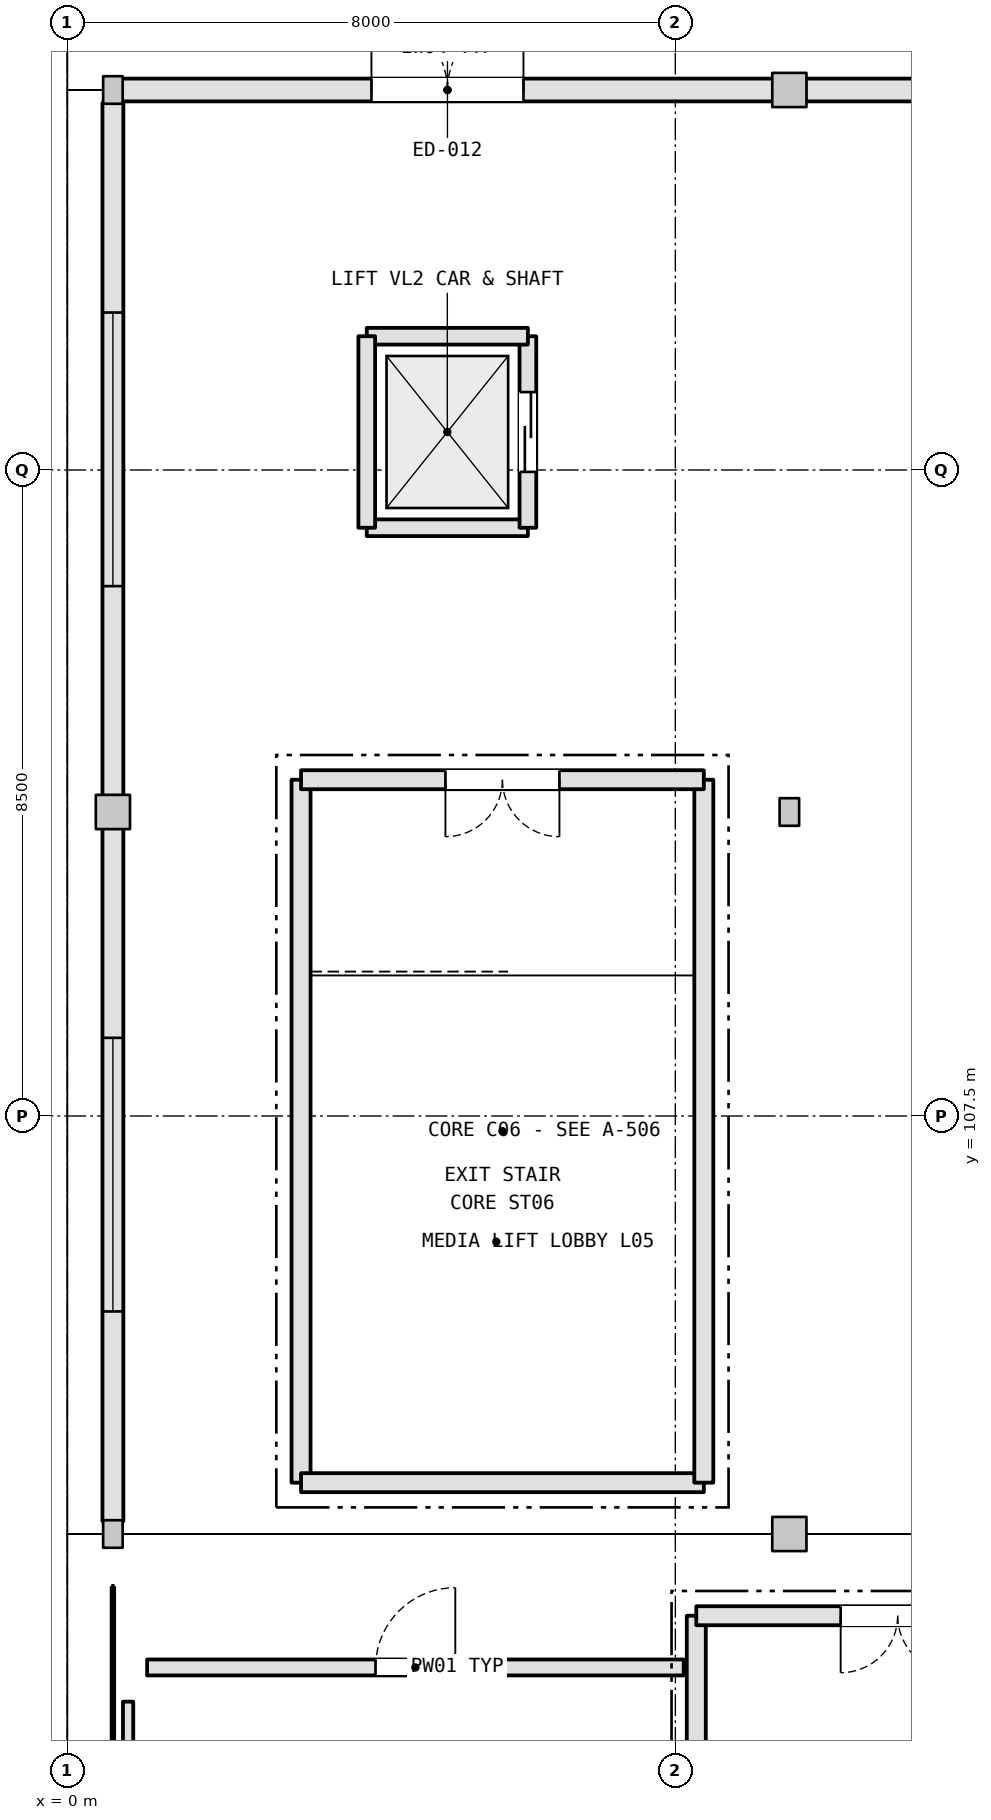
"""IFC4 building model, lengths in metres.
Left out: names, types, materials, properties, quantities, classifications, styles, units other than length and angle.
Written with IfcOpenShell. Run it as: python <this file> out.ifc"""

import sys

from ifc_helpers import new_model, si_unit, direction, frame, frame_2d, origin, origin_2d, place, context, subcontext, project, spatial, rectangle, i_section, extrude, element, fill, save


model = new_model("IFC4")
c1 = context("Model", 3, precision=1e-05, world=origin(), true_north=direction((0.0, 1.0)))
c2 = subcontext(c1, "Body", "Model", "MODEL_VIEW")
j1 = project(units=[si_unit("LENGTHUNIT", "METRE"), si_unit("PLANEANGLEUNIT", "RADIAN")], contexts=[c1])
p1 = place(None, origin())
s1 = spatial("IfcSite", under=j1, at=p1, CompositionType="ELEMENT")
p2 = place(p1, origin())
s2 = spatial("IfcBuilding", under=s1, at=p2, CompositionType="ELEMENT")
p3 = place(p2, frame((0.0, 0.0, 27.0)))
s3 = spatial("IfcBuildingStorey", under=s2, at=p3, CompositionType="ELEMENT", Elevation=27.0)
p4 = place(p3, frame((0.6, 102.0, 0.0), z_axis=(0.0, 0.0, 1.0), x_axis=(1.0, 0.0, 0.0)))
e1 = element("IfcColumn", 1, at=p4, inside=s3, PredefinedType="COLUMN", context=c2, shape_type="SweptSolid", body=[
    extrude(i_section(OverallWidth=0.257, OverallDepth=0.363, WebThickness=0.013, FlangeThickness=0.022, FilletRadius=0.015, at=origin_2d()), origin(), (0.0, 0.0, 1.0), 4.671),
])
p5 = place(p3, frame((0.6, 111.5, 0.0), z_axis=(0.0, 0.0, 1.0), x_axis=(1.0, 0.0, 0.0)))
e2 = element("IfcColumn", 2, at=p5, inside=s3, PredefinedType="COLUMN", context=c2, shape_type="SweptSolid", body=[
    extrude(rectangle(XDim=0.45, YDim=0.45, at=origin_2d()), origin(), (0.0, 0.0, 1.0), 4.671),
])
p6 = place(p3, frame((0.6, 121.0, 0.0), z_axis=(0.0, 0.0, 1.0), x_axis=(1.0, 0.0, 0.0)))
e3 = element("IfcColumn", 3, at=p6, inside=s3, PredefinedType="COLUMN", context=c2, shape_type="SweptSolid", body=[
    extrude(i_section(OverallWidth=0.257, OverallDepth=0.363, WebThickness=0.013, FlangeThickness=0.022, FilletRadius=0.015, at=origin_2d()), origin(), (0.0, 0.0, 1.0), 4.671),
])
p7 = place(p3, frame((9.5, 102.0, 0.0), z_axis=(0.0, 0.0, 1.0), x_axis=(1.0, 0.0, 0.0)))
e4 = element("IfcColumn", 4, at=p7, inside=s3, PredefinedType="COLUMN", context=c2, shape_type="SweptSolid", body=[
    extrude(rectangle(XDim=0.45, YDim=0.45, at=origin_2d()), origin(), (0.0, 0.0, 1.0), 5.428),
])
p8 = place(p3, frame((9.5, 111.5, 0.0), z_axis=(0.0, 0.0, 1.0), x_axis=(1.0, 0.0, 0.0)))
e5 = element("IfcColumn", 5, at=p8, inside=s3, PredefinedType="COLUMN", context=c2, shape_type="SweptSolid", body=[
    extrude(i_section(OverallWidth=0.257, OverallDepth=0.363, WebThickness=0.013, FlangeThickness=0.022, FilletRadius=0.015, at=origin_2d()), origin(), (0.0, 0.0, 1.0), 5.428),
])
p9 = place(p3, frame((9.5, 121.0, 0.0), z_axis=(0.0, 0.0, 1.0), x_axis=(1.0, 0.0, 0.0)))
e6 = element("IfcColumn", 6, at=p9, inside=s3, PredefinedType="COLUMN", context=c2, shape_type="SweptSolid", body=[
    extrude(rectangle(XDim=0.45, YDim=0.45, at=origin_2d()), origin(), (0.0, 0.0, 1.0), 5.428),
])
p10 = place(p3, frame((0.6, 102.169, 0.0), z_axis=(0.0, 0.0, 1.0), x_axis=(0.0, 1.0, 0.0)))
e7 = element("IfcWall", 7, at=p10, inside=s3, PredefinedType="STANDARD", context=c2, shape_type="SweptSolid", body=[
    extrude(rectangle(XDim=9.118, YDim=0.275, at=frame_2d((4.559, 0.0))), origin(), (0.0, 0.0, 1.0), 3.5),
])
p11 = place(p10, frame((2.759, 0.0, 1.05)))
e8 = element("IfcOpeningElement", 8, at=p11, cuts=e7, PredefinedType="OPENING", context=c2, shape_type="SweptSolid", body=[
    extrude(rectangle(XDim=3.6, YDim=2.0, at=frame_2d((1.8, 1.0))), frame((0.0, 0.147, 0.0), z_axis=(0.0, -1.0, 0.0), x_axis=(1.0, 0.0, 0.0)), (0.0, 0.0, 1.0), 0.295),
])
p12 = place(p3, frame((0.6, 111.713, 0.0), z_axis=(0.0, 0.0, 1.0), x_axis=(0.0, 1.0, 0.0)))
e9 = element("IfcWall", 9, at=p12, inside=s3, PredefinedType="STANDARD", context=c2, shape_type="SweptSolid", body=[
    extrude(rectangle(XDim=9.118, YDim=0.275, at=frame_2d((4.559, 0.0))), origin(), (0.0, 0.0, 1.0), 3.5),
])
p13 = place(p12, frame((2.759, 0.0, 1.05)))
e10 = element("IfcOpeningElement", 10, at=p13, cuts=e9, PredefinedType="OPENING", context=c2, shape_type="SweptSolid", body=[
    extrude(rectangle(XDim=3.6, YDim=2.0, at=frame_2d((1.8, 1.0))), frame((0.0, 0.147, 0.0), z_axis=(0.0, -1.0, 0.0), x_axis=(1.0, 0.0, 0.0)), (0.0, 0.0, 1.0), 0.295),
])
p14 = place(p3, frame((0.717, 121.0, 0.0), z_axis=(0.0, 0.0, 1.0), x_axis=(1.0, 0.0, 0.0)))
e11 = element("IfcWall", 11, at=p14, inside=s3, PredefinedType="SOLIDWALL", context=c2, shape_type="SweptSolid", body=[
    extrude(rectangle(XDim=8.571, YDim=0.3, at=frame_2d((4.285, 0.0))), origin(), (0.0, 0.0, 1.0), 3.5),
])
p15 = place(p14, frame((3.285, 0.0, 0.0)))
e12 = element("IfcOpeningElement", 12, at=p15, cuts=e11, PredefinedType="OPENING", context=c2, shape_type="SweptSolid", body=[
    extrude(rectangle(XDim=2.0, YDim=2.25, at=frame_2d((1.0, 1.125))), frame((0.0, 0.16, 0.0), z_axis=(0.0, -1.0, 0.0), x_axis=(1.0, 0.0, 0.0)), (0.0, 0.0, 1.0), 0.32),
])
p16 = place(p3, frame((9.713, 121.0, 0.0), z_axis=(0.0, 0.0, 1.0), x_axis=(1.0, 0.0, 0.0)))
e13 = element("IfcWall", 13, at=p16, inside=s3, PredefinedType="SOLIDWALL", context=c2, shape_type="SweptSolid", body=[
    extrude(rectangle(XDim=8.571, YDim=0.3, at=frame_2d((4.285, 0.0))), origin(), (0.0, 0.0, 1.0), 3.5),
])
p17 = place(p3, frame((3.075, 111.925, 0.0), z_axis=(0.0, 0.0, 1.0), x_axis=(0.0, -1.0, 0.0)))
e14 = element("IfcWall", 14, at=p17, inside=s3, PredefinedType="SHEAR", context=c2, shape_type="SweptSolid", body=[
    extrude(rectangle(XDim=9.249, YDim=0.25, at=frame_2d((4.625, 0.0))), origin(), (0.0, 0.0, 1.0), 4.62),
])
p18 = place(p3, frame((3.075, 102.675, 0.0), z_axis=(0.0, 0.0, 1.0), x_axis=(1.0, 0.0, 0.0)))
e15 = element("IfcWall", 15, at=p18, inside=s3, PredefinedType="SHEAR", context=c2, shape_type="SweptSolid", body=[
    extrude(rectangle(XDim=5.299, YDim=0.25, at=frame_2d((2.649, 0.0))), origin(), (0.0, 0.0, 1.0), 4.62),
])
p19 = place(p3, frame((8.375, 102.675, 0.0), z_axis=(0.0, 0.0, 1.0), x_axis=(0.0, 1.0, 0.0)))
e16 = element("IfcWall", 16, at=p19, inside=s3, PredefinedType="SHEAR", context=c2, shape_type="SweptSolid", body=[
    extrude(rectangle(XDim=9.249, YDim=0.25, at=frame_2d((4.625, 0.0))), origin(), (0.0, 0.0, 1.0), 4.62),
])
p20 = place(p3, frame((8.375, 111.925, 0.0), z_axis=(0.0, 0.0, 1.0), x_axis=(-1.0, 0.0, 0.0)))
e17 = element("IfcWall", 17, at=p20, inside=s3, PredefinedType="SHEAR", context=c2, shape_type="SweptSolid", body=[
    extrude(rectangle(XDim=5.299, YDim=0.25, at=frame_2d((2.649, 0.0))), origin(), (0.0, 0.0, 1.0), 4.62),
])
p21 = place(p20, frame((1.9, 0.0, 0.0)))
e18 = element("IfcOpeningElement", 18, at=p21, cuts=e17, PredefinedType="OPENING", context=c2, shape_type="SweptSolid", body=[
    extrude(rectangle(XDim=1.5, YDim=2.2, at=frame_2d((0.75, 1.1))), frame((0.0, 0.135, 0.0), z_axis=(0.0, -1.0, 0.0), x_axis=(1.0, 0.0, 0.0)), (0.0, 0.0, 1.0), 0.27),
])
p22 = place(p3, frame((8.275, 100.925, 0.0), z_axis=(0.0, 0.0, 1.0), x_axis=(0.0, -1.0, 0.0)))
e19 = element("IfcWall", 19, at=p22, inside=s3, PredefinedType="SHEAR", context=c2, shape_type="SweptSolid", body=[
    extrude(rectangle(XDim=9.249, YDim=0.25, at=frame_2d((4.625, 0.0))), origin(), (0.0, 0.0, 1.0), 4.62),
])
p23 = place(p3, frame((13.575, 100.925, 0.0), z_axis=(0.0, 0.0, 1.0), x_axis=(-1.0, 0.0, 0.0)))
e20 = element("IfcWall", 20, at=p23, inside=s3, PredefinedType="SHEAR", context=c2, shape_type="SweptSolid", body=[
    extrude(rectangle(XDim=5.299, YDim=0.25, at=frame_2d((2.65, 0.0))), origin(), (0.0, 0.0, 1.0), 4.62),
])
p24 = place(p23, frame((1.9, 0.0, 0.0)))
e21 = element("IfcOpeningElement", 21, at=p24, cuts=e20, PredefinedType="OPENING", context=c2, shape_type="SweptSolid", body=[
    extrude(rectangle(XDim=1.5, YDim=2.2, at=frame_2d((0.75, 1.1))), frame((0.0, 0.135, 0.0), z_axis=(0.0, -1.0, 0.0), x_axis=(1.0, 0.0, 0.0)), (0.0, 0.0, 1.0), 0.27),
])
p25 = place(p3, frame((3.94, 115.24, 0.0), z_axis=(0.0, 0.0, 1.0), x_axis=(1.0, 0.0, 0.0)))
e22 = element("IfcWall", 22, at=p25, inside=s3, PredefinedType="SHEAR", context=c2, shape_type="SweptSolid", body=[
    extrude(rectangle(XDim=2.12, YDim=0.22, at=frame_2d((1.06, 0.0))), origin(), (0.0, 0.0, 1.0), 4.62),
])
p26 = place(p3, frame((6.06, 115.24, 0.0), z_axis=(0.0, 0.0, 1.0), x_axis=(0.0, 1.0, 0.0)))
e23 = element("IfcWall", 23, at=p26, inside=s3, PredefinedType="SHEAR", context=c2, shape_type="SweptSolid", body=[
    extrude(rectangle(XDim=2.52, YDim=0.22, at=frame_2d((1.26, 0.0))), origin(), (0.0, 0.0, 1.0), 4.62),
])
p27 = place(p26, frame((0.735, 0.0, 0.0)))
e24 = element("IfcOpeningElement", 24, at=p27, cuts=e23, PredefinedType="OPENING", context=c2, shape_type="SweptSolid", body=[
    extrude(rectangle(XDim=1.05, YDim=2.15, at=frame_2d((0.525, 1.075))), frame((0.0, 0.12, 0.0), z_axis=(0.0, -1.0, 0.0), x_axis=(1.0, 0.0, 0.0)), (0.0, 0.0, 1.0), 0.24),
])
p28 = place(p3, frame((6.06, 117.76, 0.0), z_axis=(0.0, 0.0, 1.0), x_axis=(-1.0, 0.0, 0.0)))
e25 = element("IfcWall", 25, at=p28, inside=s3, PredefinedType="SHEAR", context=c2, shape_type="SweptSolid", body=[
    extrude(rectangle(XDim=2.12, YDim=0.22, at=frame_2d((1.06, 0.0))), origin(), (0.0, 0.0, 1.0), 4.62),
])
p29 = place(p3, frame((3.94, 117.76, 0.0), z_axis=(0.0, 0.0, 1.0), x_axis=(0.0, -1.0, 0.0)))
e26 = element("IfcWall", 26, at=p29, inside=s3, PredefinedType="SHEAR", context=c2, shape_type="SweptSolid", body=[
    extrude(rectangle(XDim=2.52, YDim=0.22, at=frame_2d((1.26, 0.0))), origin(), (0.0, 0.0, 1.0), 4.62),
])
p30 = place(p3, frame((1.05, 100.244, 0.0), z_axis=(0.0, 0.0, 1.0), x_axis=(1.0, 0.0, 0.0)))
e27 = element("IfcWall", 27, at=p30, inside=s3, PredefinedType="PLUMBINGWALL", context=c2, shape_type="SweptSolid", body=[
    extrude(rectangle(XDim=7.06, YDim=0.21, at=frame_2d((3.53, 0.0))), origin(), (0.0, 0.0, 1.0), 3.5),
])
p31 = place(p30, frame((3.005, 0.0, 0.0)))
e28 = element("IfcOpeningElement", 28, at=p31, cuts=e27, PredefinedType="OPENING", context=c2, shape_type="SweptSolid", body=[
    extrude(rectangle(XDim=1.05, YDim=2.2, at=frame_2d((0.525, 1.1))), frame((0.0, 0.115, 0.0), z_axis=(0.0, -1.0, 0.0), x_axis=(1.0, 0.0, 0.0)), (0.0, 0.0, 1.0), 0.23),
])
p32 = place(p3, frame((0.8, 94.799, 0.0), z_axis=(0.0, 0.0, 1.0), x_axis=(0.0, 1.0, 0.0)))
e29 = element("IfcWall", 29, at=p32, inside=s3, PredefinedType="PARTITIONING", context=c2, shape_type="SweptSolid", body=[
    extrude(rectangle(XDim=4.995, YDim=0.135, at=frame_2d((2.498, 0.0))), origin(), (0.0, 0.0, 1.0), 3.5),
])
p33 = place(p11, origin())
e30 = element("IfcWindow", 30, at=p33, inside=s3, PartitioningType="SINGLE_PANEL", PredefinedType="WINDOW", context=c2, shape_type="SweptSolid", body=[
    extrude(rectangle(XDim=3.6, YDim=2.0, at=frame_2d((1.8, 1.0))), frame((0.0, 0.03, 0.0), z_axis=(0.0, -1.0, 0.0), x_axis=(1.0, 0.0, 0.0)), (0.0, 0.0, 1.0), 0.06),
])
fill(e8, e30)
p34 = place(p13, origin())
e31 = element("IfcWindow", 31, at=p34, inside=s3, PartitioningType="SINGLE_PANEL", PredefinedType="WINDOW", context=c2, shape_type="SweptSolid", body=[
    extrude(rectangle(XDim=3.6, YDim=2.0, at=frame_2d((1.8, 1.0))), frame((0.0, 0.03, 0.0), z_axis=(0.0, -1.0, 0.0), x_axis=(1.0, 0.0, 0.0)), (0.0, 0.0, 1.0), 0.06),
])
fill(e10, e31)
p35 = place(p15, origin())
e32 = element("IfcDoor", 32, at=p35, inside=s3, OperationType="DOUBLE_DOOR_SINGLE_SWING", PredefinedType="DOOR", context=c2, shape_type="SweptSolid", body=[
    extrude(rectangle(XDim=2.0, YDim=2.25, at=frame_2d((1.0, 1.125))), frame((0.0, 0.025, 0.0), z_axis=(0.0, -1.0, 0.0), x_axis=(1.0, 0.0, 0.0)), (0.0, 0.0, 1.0), 0.05),
])
fill(e12, e32)
p36 = place(p21, origin())
e33 = element("IfcDoor", 33, at=p36, inside=s3, OperationType="DOUBLE_DOOR_SINGLE_SWING", PredefinedType="DOOR", context=c2, shape_type="SweptSolid", body=[
    extrude(rectangle(XDim=1.5, YDim=2.2, at=frame_2d((0.75, 1.1))), frame((0.0, 0.025, 0.0), z_axis=(0.0, -1.0, 0.0), x_axis=(1.0, 0.0, 0.0)), (0.0, 0.0, 1.0), 0.05),
])
fill(e18, e33)
p37 = place(p24, origin())
e34 = element("IfcDoor", 34, at=p37, inside=s3, OperationType="DOUBLE_DOOR_SINGLE_SWING", PredefinedType="DOOR", context=c2, shape_type="SweptSolid", body=[
    extrude(rectangle(XDim=1.5, YDim=2.2, at=frame_2d((0.75, 1.1))), frame((0.0, 0.025, 0.0), z_axis=(0.0, -1.0, 0.0), x_axis=(1.0, 0.0, 0.0)), (0.0, 0.0, 1.0), 0.05),
])
fill(e21, e34)
p38 = place(p27, origin())
e35 = element("IfcDoor", 35, at=p38, inside=s3, OperationType="DOUBLE_DOOR_SLIDING", PredefinedType="DOOR", context=c2, shape_type="SweptSolid", body=[
    extrude(rectangle(XDim=1.05, YDim=2.15, at=frame_2d((0.525, 1.075))), frame((0.0, 0.025, 0.0), z_axis=(0.0, -1.0, 0.0), x_axis=(1.0, 0.0, 0.0)), (0.0, 0.0, 1.0), 0.05),
])
fill(e24, e35)
p39 = place(p31, origin())
e36 = element("IfcDoor", 36, at=p39, inside=s3, OperationType="SINGLE_SWING_RIGHT", PredefinedType="DOOR", context=c2, shape_type="SweptSolid", body=[
    extrude(rectangle(XDim=1.05, YDim=2.2, at=frame_2d((0.525, 1.1))), frame((0.0, 0.025, 0.0), z_axis=(0.0, -1.0, 0.0), x_axis=(1.0, 0.0, 0.0)), (0.0, 0.0, 1.0), 0.05),
])
fill(e28, e36)
save(model, sys.argv[1])
